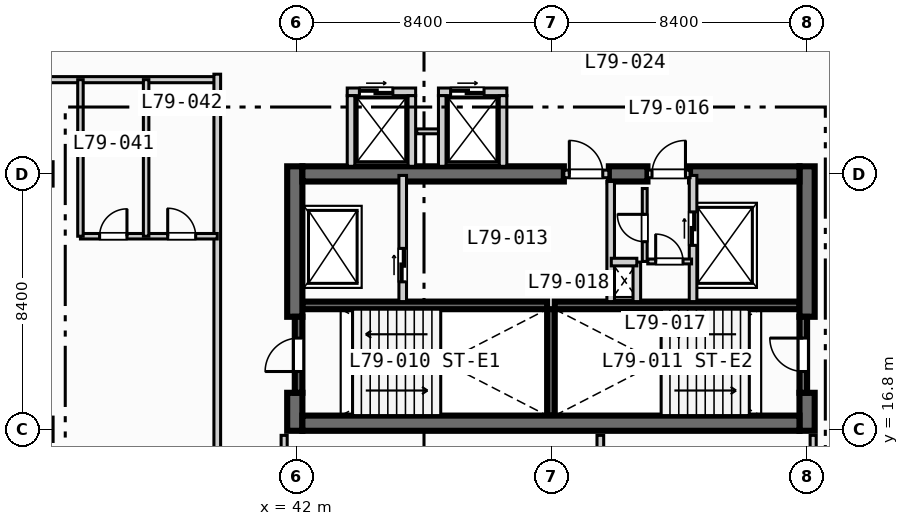
"""IFC4 building model, lengths in metres.
Left out: names, types, materials, properties, quantities, classifications, styles, units other than length and angle.
Written with IfcOpenShell. Run it as: python <this file> out.ifc"""

import sys

from ifc_helpers import new_model, si_unit, direction, frame, frame_2d, origin, place, context, subcontext, project, spatial, rectangle, extrude, element, fill, save


model = new_model("IFC4")
c1 = context("Model", 3, precision=1e-05, world=origin(), true_north=direction((0.0, 1.0)))
c2 = subcontext(c1, "Body", "Model", "MODEL_VIEW")
j1 = project(units=[si_unit("LENGTHUNIT", "METRE"), si_unit("PLANEANGLEUNIT", "RADIAN")], contexts=[c1])
p1 = place(None, origin())
s1 = spatial("IfcSite", under=j1, at=p1, CompositionType="ELEMENT")
p2 = place(p1, origin())
s2 = spatial("IfcBuilding", under=s1, at=p2, CompositionType="ELEMENT")
p3 = place(p2, frame((0.0, 0.0, 320.3)))
s3 = spatial("IfcBuildingStorey", under=s2, at=p3, CompositionType="ELEMENT", Elevation=320.3)
for number, where, z_axis, x_axis in (
    (1, (42.2, 20.875, 0.0), (0.0, 0.0, 1.0), (1.0, 0.0, 0.0)),
    (2, (50.5, 20.875, 0.0), (0.0, 0.0, 1.0), (1.0, 0.0, 0.0)),
):
    element("IfcWall", number, at=place(p3, frame(where, z_axis=z_axis, x_axis=x_axis)), inside=s3, PredefinedType="SOLIDWALL", context=c2, shape_type="SweptSolid", body=[
        extrude(rectangle(XDim=8.05, YDim=0.25, at=frame_2d((4.025, 0.0))), origin(), (0.0, 0.0, 1.0), 3.67),
    ])
p4 = place(p3, frame((50.375, 17.25, 0.0), z_axis=(0.0, 0.0, 1.0), x_axis=(0.0, 1.0, 0.0)))
e3 = element("IfcWall", 3, at=p4, inside=s3, PredefinedType="SOLIDWALL", context=c2, shape_type="SweptSolid", body=[
    extrude(rectangle(XDim=3.5, YDim=0.25, at=frame_2d((1.75, 0.0))), origin(), (0.0, 0.0, 1.0), 3.67),
])
p5 = place(p3, frame((41.95, 16.75, 0.0), z_axis=(0.0, 0.0, 1.0), x_axis=(0.0, 1.0, 0.0)))
e4 = element("IfcWall", 4, at=p5, inside=s3, PredefinedType="SHEAR", context=c2, shape_type="SweptSolid", body=[
    extrude(rectangle(XDim=1.25, YDim=0.5, at=frame_2d((0.625, 0.0))), origin(), (0.0, 0.0, 1.0), 3.67),
])
p6 = place(p3, frame((41.95, 20.5, 0.0), z_axis=(0.0, 0.0, 1.0), x_axis=(0.0, 1.0, 0.0)))
e5 = element("IfcWall", 5, at=p6, inside=s3, PredefinedType="SHEAR", context=c2, shape_type="SweptSolid", body=[
    extrude(rectangle(XDim=4.95, YDim=0.5, at=frame_2d((2.475, 0.0))), origin(), (0.0, 0.0, 1.0), 3.67),
])
p7 = place(p3, frame((58.8, 16.75, 0.0), z_axis=(0.0, 0.0, 1.0), x_axis=(0.0, 1.0, 0.0)))
e6 = element("IfcWall", 6, at=p7, inside=s3, PredefinedType="SHEAR", context=c2, shape_type="SweptSolid", body=[
    extrude(rectangle(XDim=1.25, YDim=0.5, at=frame_2d((0.625, 0.0))), origin(), (0.0, 0.0, 1.0), 3.67),
])
p8 = place(p3, frame((58.8, 20.5, 0.0), z_axis=(0.0, 0.0, 1.0), x_axis=(0.0, 1.0, 0.0)))
e7 = element("IfcWall", 7, at=p8, inside=s3, PredefinedType="SHEAR", context=c2, shape_type="SweptSolid", body=[
    extrude(rectangle(XDim=4.95, YDim=0.5, at=frame_2d((2.475, 0.0))), origin(), (0.0, 0.0, 1.0), 3.67),
])
p9 = place(p3, frame((42.2, 17.0, 0.0), z_axis=(0.0, 0.0, 1.0), x_axis=(1.0, 0.0, 0.0)))
e8 = element("IfcWall", 8, at=p9, inside=s3, PredefinedType="SHEAR", context=c2, shape_type="SweptSolid", body=[
    extrude(rectangle(XDim=16.35, YDim=0.5, at=frame_2d((8.175, 0.0))), origin(), (0.0, 0.0, 1.0), 3.67),
])
p10 = place(p3, frame((42.2, 25.2, 0.0), z_axis=(0.0, 0.0, 1.0), x_axis=(1.0, 0.0, 0.0)))
e9 = element("IfcWall", 9, at=p10, inside=s3, PredefinedType="SHEAR", context=c2, shape_type="SweptSolid", body=[
    extrude(rectangle(XDim=8.6, YDim=0.5, at=frame_2d((4.3, 0.0))), origin(), (0.0, 0.0, 1.0), 3.67),
])
p11 = place(p3, frame((52.28, 25.2, 0.0), z_axis=(0.0, 0.0, 1.0), x_axis=(1.0, 0.0, 0.0)))
e10 = element("IfcWall", 10, at=p11, inside=s3, PredefinedType="SHEAR", context=c2, shape_type="SweptSolid", body=[
    extrude(rectangle(XDim=1.27, YDim=0.5, at=frame_2d((0.635, 0.0))), origin(), (0.0, 0.0, 1.0), 3.67),
])
p12 = place(p3, frame((54.95, 25.2, 0.0), z_axis=(0.0, 0.0, 1.0), x_axis=(1.0, 0.0, 0.0)))
e11 = element("IfcWall", 11, at=p12, inside=s3, PredefinedType="SHEAR", context=c2, shape_type="SweptSolid", body=[
    extrude(rectangle(XDim=3.6, YDim=0.5, at=frame_2d((1.8, 0.0))), origin(), (0.0, 0.0, 1.0), 3.67),
])
p13 = place(p3, frame((42.075, 18.0, 0.0), z_axis=(0.0, 0.0, 1.0), x_axis=(0.0, 1.0, 0.0)))
e12 = element("IfcWall", 12, at=p13, inside=s3, PredefinedType="SOLIDWALL", context=c2, shape_type="SweptSolid", body=[
    extrude(rectangle(XDim=2.5, YDim=0.25, at=frame_2d((1.25, 0.0))), origin(), (0.0, 0.0, 1.0), 3.67),
])
p14 = place(p13, frame((0.7, 0.0, 0.0)))
e13 = element("IfcOpeningElement", 13, at=p14, cuts=e12, PredefinedType="OPENING", context=c2, shape_type="SweptSolid", body=[
    extrude(rectangle(XDim=1.1, YDim=2.15, at=frame_2d((0.55, 1.075))), frame((0.0, 0.135, 0.0), z_axis=(0.0, -1.0, 0.0), x_axis=(1.0, 0.0, 0.0)), (0.0, 0.0, 1.0), 0.27),
])
p15 = place(p3, frame((58.675, 18.0, 0.0), z_axis=(0.0, 0.0, 1.0), x_axis=(0.0, 1.0, 0.0)))
e14 = element("IfcWall", 14, at=p15, inside=s3, PredefinedType="SOLIDWALL", context=c2, shape_type="SweptSolid", body=[
    extrude(rectangle(XDim=2.5, YDim=0.25, at=frame_2d((1.25, 0.0))), origin(), (0.0, 0.0, 1.0), 3.67),
])
p16 = place(p15, frame((0.7, 0.0, 0.0)))
e15 = element("IfcOpeningElement", 15, at=p16, cuts=e14, PredefinedType="OPENING", context=c2, shape_type="SweptSolid", body=[
    extrude(rectangle(XDim=1.1, YDim=2.15, at=frame_2d((0.55, 1.075))), frame((0.0, 0.135, 0.0), z_axis=(0.0, -1.0, 0.0), x_axis=(1.0, 0.0, 0.0)), (0.0, 0.0, 1.0), 0.27),
])
p17 = place(p3, frame((45.5, 21.0, 0.0), z_axis=(0.0, 0.0, 1.0), x_axis=(0.0, 1.0, 0.0)))
e16 = element("IfcWall", 16, at=p17, inside=s3, PredefinedType="SOLIDWALL", context=c2, shape_type="SweptSolid", body=[
    extrude(rectangle(XDim=4.15, YDim=0.25, at=frame_2d((2.075, 0.0))), origin(), (0.0, 0.0, 1.0), 3.67),
])
p18 = place(p17, frame((0.65, 0.0, 0.0)))
e17 = element("IfcOpeningElement", 17, at=p18, cuts=e16, PredefinedType="OPENING", context=c2, shape_type="SweptSolid", body=[
    extrude(rectangle(XDim=1.1, YDim=2.15, at=frame_2d((0.55, 1.075))), frame((0.0, 0.135, 0.0), z_axis=(0.0, -1.0, 0.0), x_axis=(1.0, 0.0, 0.0)), (0.0, 0.0, 1.0), 0.27),
])
p19 = place(p3, frame((50.8, 25.2, 0.0), z_axis=(0.0, 0.0, 1.0), x_axis=(1.0, 0.0, 0.0)))
e18 = element("IfcWall", 18, at=p19, inside=s3, PredefinedType="SOLIDWALL", context=c2, shape_type="SweptSolid", body=[
    extrude(rectangle(XDim=1.48, YDim=0.25, at=frame_2d((0.74, 0.0))), origin(), (0.0, 0.0, 1.0), 3.67),
])
p20 = place(p19, frame((0.18, 0.0, 0.0)))
e19 = element("IfcOpeningElement", 19, at=p20, cuts=e18, PredefinedType="OPENING", context=c2, shape_type="SweptSolid", body=[
    extrude(rectangle(XDim=1.1, YDim=2.15, at=frame_2d((0.55, 1.075))), frame((0.0, 0.135, 0.0), z_axis=(0.0, -1.0, 0.0), x_axis=(1.0, 0.0, 0.0)), (0.0, 0.0, 1.0), 0.27),
])
p21 = place(p3, frame((52.34, 21.0, 0.0), z_axis=(0.0, 0.0, 1.0), x_axis=(0.0, 1.0, 0.0)))
e20 = element("IfcWall", 20, at=p21, inside=s3, PredefinedType="SOLIDWALL", context=c2, shape_type="SweptSolid", body=[
    extrude(rectangle(XDim=3.95, YDim=0.25, at=frame_2d((1.975, 0.0))), origin(), (0.0, 0.0, 1.0), 3.67),
])
p22 = place(p3, frame((55.05, 21.0, 0.0), z_axis=(0.0, 0.0, 1.0), x_axis=(0.0, 1.0, 0.0)))
e21 = element("IfcWall", 21, at=p22, inside=s3, PredefinedType="SOLIDWALL", context=c2, shape_type="SweptSolid", body=[
    extrude(rectangle(XDim=4.15, YDim=0.25, at=frame_2d((2.075, 0.0))), origin(), (0.0, 0.0, 1.0), 3.67),
])
p23 = place(p22, frame((1.85, 0.0, 0.0)))
e22 = element("IfcOpeningElement", 22, at=p23, cuts=e21, PredefinedType="OPENING", context=c2, shape_type="SweptSolid", body=[
    extrude(rectangle(XDim=1.1, YDim=2.15, at=frame_2d((0.55, 1.075))), frame((0.0, 0.135, 0.0), z_axis=(0.0, -1.0, 0.0), x_axis=(1.0, 0.0, 0.0)), (0.0, 0.0, 1.0), 0.27),
])
p24 = place(p3, frame((53.55, 25.2, 0.0), z_axis=(0.0, 0.0, 1.0), x_axis=(1.0, 0.0, 0.0)))
e23 = element("IfcWall", 23, at=p24, inside=s3, PredefinedType="SOLIDWALL", context=c2, shape_type="SweptSolid", body=[
    extrude(rectangle(XDim=1.4, YDim=0.25, at=frame_2d((0.7, 0.0))), origin(), (0.0, 0.0, 1.0), 3.67),
])
p25 = place(p24, frame((0.15, 0.0, 0.0)))
e24 = element("IfcOpeningElement", 24, at=p25, cuts=e23, PredefinedType="OPENING", context=c2, shape_type="SweptSolid", body=[
    extrude(rectangle(XDim=1.1, YDim=2.15, at=frame_2d((0.55, 1.075))), frame((0.0, 0.135, 0.0), z_axis=(0.0, -1.0, 0.0), x_axis=(1.0, 0.0, 0.0)), (0.0, 0.0, 1.0), 0.27),
])
p26 = place(p3, frame((53.2, 21.0, 0.0), z_axis=(0.0, 0.0, 1.0), x_axis=(0.0, 1.0, 0.0)))
e25 = element("IfcWall", 25, at=p26, inside=s3, PredefinedType="SOLIDWALL", context=c2, shape_type="SweptSolid", body=[
    extrude(rectangle(XDim=1.3, YDim=0.25, at=frame_2d((0.65, 0.0))), origin(), (0.0, 0.0, 1.0), 3.67),
])
p27 = place(p3, frame((52.36, 22.3, 0.0), z_axis=(0.0, 0.0, 1.0), x_axis=(1.0, 0.0, 0.0)))
e26 = element("IfcWall", 26, at=p27, inside=s3, PredefinedType="SOLIDWALL", context=c2, shape_type="SweptSolid", body=[
    extrude(rectangle(XDim=0.84, YDim=0.25, at=frame_2d((0.42, 0.0))), origin(), (0.0, 0.0, 1.0), 3.67),
])
p28 = place(p3, frame((53.56, 22.32, 0.0), z_axis=(0.0, 0.0, 1.0), x_axis=(1.0, 0.0, 0.0)))
e27 = element("IfcWall", 27, at=p28, inside=s3, PredefinedType="PARTITIONING", context=c2, shape_type="SweptSolid", body=[
    extrude(rectangle(XDim=1.44, YDim=0.16, at=frame_2d((0.72, 0.0))), origin(), (0.0, 0.0, 1.0), 3.67),
])
p29 = place(p28, frame((0.26, 0.0, 0.0)))
e28 = element("IfcOpeningElement", 28, at=p29, cuts=e27, PredefinedType="OPENING", context=c2, shape_type="SweptSolid", body=[
    extrude(rectangle(XDim=0.9, YDim=2.1, at=frame_2d((0.45, 1.05))), frame((0.0, 0.09, 0.0), z_axis=(0.0, -1.0, 0.0), x_axis=(1.0, 0.0, 0.0)), (0.0, 0.0, 1.0), 0.18),
])
p30 = place(p3, frame((53.46, 22.32, 0.0), z_axis=(0.0, 0.0, 1.0), x_axis=(0.0, 1.0, 0.0)))
e29 = element("IfcWall", 29, at=p30, inside=s3, PredefinedType="PARTITIONING", context=c2, shape_type="SweptSolid", body=[
    extrude(rectangle(XDim=2.4, YDim=0.16, at=frame_2d((1.2, 0.0))), origin(), (0.0, 0.0, 1.0), 3.67),
])
p31 = place(p30, frame((0.65, 0.0, 0.0)))
e30 = element("IfcOpeningElement", 30, at=p31, cuts=e29, PredefinedType="OPENING", context=c2, shape_type="SweptSolid", body=[
    extrude(rectangle(XDim=0.9, YDim=2.1, at=frame_2d((0.45, 1.05))), frame((0.0, 0.09, 0.0), z_axis=(0.0, -1.0, 0.0), x_axis=(1.0, 0.0, 0.0)), (0.0, 0.0, 1.0), 0.18),
])
p32 = place(p3, frame((43.675, 27.9, 0.0), z_axis=(0.0, 0.0, 1.0), x_axis=(1.0, 0.0, 0.0)))
e31 = element("IfcWall", 31, at=p32, inside=s3, PredefinedType="SOLIDWALL", context=c2, shape_type="SweptSolid", body=[
    extrude(rectangle(XDim=2.25, YDim=0.25, at=frame_2d((1.125, 0.0))), origin(), (0.0, 0.0, 1.0), 3.67),
])
p33 = place(p32, frame((0.4, 0.0, 0.0)))
e32 = element("IfcOpeningElement", 32, at=p33, cuts=e31, PredefinedType="OPENING", context=c2, shape_type="SweptSolid", body=[
    extrude(rectangle(XDim=1.1, YDim=2.15, at=frame_2d((0.55, 1.075))), frame((0.0, 0.135, 0.0), z_axis=(0.0, -1.0, 0.0), x_axis=(1.0, 0.0, 0.0)), (0.0, 0.0, 1.0), 0.27),
])
for number, where, z_axis, x_axis in (
    (33, (43.8, 25.45, 0.0), (0.0, 0.0, 1.0), (0.0, 1.0, 0.0)),
    (34, (45.8, 25.45, 0.0), (0.0, 0.0, 1.0), (0.0, 1.0, 0.0)),
):
    element("IfcWall", number, at=place(p3, frame(where, z_axis=z_axis, x_axis=x_axis)), inside=s3, PredefinedType="SOLIDWALL", context=c2, shape_type="SweptSolid", body=[
        extrude(rectangle(XDim=2.325, YDim=0.25, at=frame_2d((1.163, 0.0))), origin(), (0.0, 0.0, 1.0), 3.67),
    ])
p34 = place(p3, frame((45.96, 26.6, 0.0), z_axis=(0.0, 0.0, 1.0), x_axis=(1.0, 0.0, 0.0)))
e35 = element("IfcWall", 35, at=p34, inside=s3, PredefinedType="PARTITIONING", context=c2, shape_type="SweptSolid", body=[
    extrude(rectangle(XDim=0.88, YDim=0.16, at=frame_2d((0.44, 0.0))), origin(), (0.0, 0.0, 1.0), 3.67),
])
p35 = place(p3, frame((46.675, 27.9, 0.0), z_axis=(0.0, 0.0, 1.0), x_axis=(1.0, 0.0, 0.0)))
e36 = element("IfcWall", 36, at=p35, inside=s3, PredefinedType="SOLIDWALL", context=c2, shape_type="SweptSolid", body=[
    extrude(rectangle(XDim=2.25, YDim=0.25, at=frame_2d((1.125, 0.0))), origin(), (0.0, 0.0, 1.0), 3.67),
])
p36 = place(p35, frame((0.4, 0.0, 0.0)))
e37 = element("IfcOpeningElement", 37, at=p36, cuts=e36, PredefinedType="OPENING", context=c2, shape_type="SweptSolid", body=[
    extrude(rectangle(XDim=1.1, YDim=2.15, at=frame_2d((0.55, 1.075))), frame((0.0, 0.135, 0.0), z_axis=(0.0, -1.0, 0.0), x_axis=(1.0, 0.0, 0.0)), (0.0, 0.0, 1.0), 0.27),
])
for number, where, z_axis, x_axis in (
    (38, (46.8, 25.45, 0.0), (0.0, 0.0, 1.0), (0.0, 1.0, 0.0)),
    (39, (48.8, 25.45, 0.0), (0.0, 0.0, 1.0), (0.0, 1.0, 0.0)),
):
    element("IfcWall", number, at=place(p3, frame(where, z_axis=z_axis, x_axis=x_axis)), inside=s3, PredefinedType="SOLIDWALL", context=c2, shape_type="SweptSolid", body=[
        extrude(rectangle(XDim=2.325, YDim=0.25, at=frame_2d((1.163, 0.0))), origin(), (0.0, 0.0, 1.0), 3.67),
    ])
p37 = place(p3, frame((41.6, 8.65, 0.0), z_axis=(0.0, 0.0, 1.0), x_axis=(0.0, 1.0, 0.0)))
e40 = element("IfcWall", 40, at=p37, inside=s3, PredefinedType="PARTITIONING", context=c2, shape_type="SweptSolid", body=[
    extrude(rectangle(XDim=7.95, YDim=0.2, at=frame_2d((3.975, 0.0))), origin(), (0.0, 0.0, 1.0), 3.67),
])
p38 = place(p37, frame((2.2, 0.0, 0.0)))
e41 = element("IfcOpeningElement", 41, at=p38, cuts=e40, PredefinedType="OPENING", context=c2, shape_type="SweptSolid", body=[
    extrude(rectangle(XDim=0.92, YDim=2.1, at=frame_2d((0.46, 1.05))), frame((0.0, 0.11, 0.0), z_axis=(0.0, -1.0, 0.0), x_axis=(1.0, 0.0, 0.0)), (0.0, 0.0, 1.0), 0.22),
])
p39 = place(p3, frame((59.0, 8.65, 0.0), z_axis=(0.0, 0.0, 1.0), x_axis=(0.0, 1.0, 0.0)))
e42 = element("IfcWall", 42, at=p39, inside=s3, PredefinedType="PARTITIONING", context=c2, shape_type="SweptSolid", body=[
    extrude(rectangle(XDim=7.95, YDim=0.2, at=frame_2d((3.975, 0.0))), origin(), (0.0, 0.0, 1.0), 3.07),
])
p40 = place(p39, frame((2.2, 0.0, 0.0)))
e43 = element("IfcOpeningElement", 43, at=p40, cuts=e42, PredefinedType="OPENING", context=c2, shape_type="SweptSolid", body=[
    extrude(rectangle(XDim=0.92, YDim=2.1, at=frame_2d((0.46, 1.05))), frame((0.0, 0.11, 0.0), z_axis=(0.0, -1.0, 0.0), x_axis=(1.0, 0.0, 0.0)), (0.0, 0.0, 1.0), 0.22),
])
p41 = place(p3, frame((52.0, 8.65, 0.0), z_axis=(0.0, 0.0, 1.0), x_axis=(0.0, 1.0, 0.0)))
e44 = element("IfcWall", 44, at=p41, inside=s3, PredefinedType="PARTITIONING", context=c2, shape_type="SweptSolid", body=[
    extrude(rectangle(XDim=7.95, YDim=0.22, at=frame_2d((3.975, 0.0))), origin(), (0.0, 0.0, 1.0), 3.67),
])
p42 = place(p3, frame((11.8, 28.3, 0.0), z_axis=(0.0, 0.0, 1.0), x_axis=(1.0, 0.0, 0.0)))
e45 = element("IfcWall", 45, at=p42, inside=s3, PredefinedType="PARTITIONING", context=c2, shape_type="SweptSolid", body=[
    extrude(rectangle(XDim=27.6, YDim=0.2, at=frame_2d((13.8, 0.0))), origin(), (0.0, 0.0, 1.0), 3.67),
])
p43 = place(p42, frame((3.92, 0.0, 0.0)))
e46 = element("IfcOpeningElement", 46, at=p43, cuts=e45, PredefinedType="OPENING", context=c2, shape_type="SweptSolid", body=[
    extrude(rectangle(XDim=1.0, YDim=2.15, at=frame_2d((0.5, 1.075))), frame((0.0, 0.11, 0.0), z_axis=(0.0, -1.0, 0.0), x_axis=(1.0, 0.0, 0.0)), (0.0, 0.0, 1.0), 0.22),
])
p44 = place(p42, frame((12.57, 0.0, 0.0)))
e47 = element("IfcOpeningElement", 47, at=p44, cuts=e45, PredefinedType="OPENING", context=c2, shape_type="SweptSolid", body=[
    extrude(rectangle(XDim=1.0, YDim=2.15, at=frame_2d((0.5, 1.075))), frame((0.0, 0.11, 0.0), z_axis=(0.0, -1.0, 0.0), x_axis=(1.0, 0.0, 0.0)), (0.0, 0.0, 1.0), 0.22),
])
p45 = place(p42, frame((20.77, 0.0, 0.0)))
e48 = element("IfcOpeningElement", 48, at=p45, cuts=e45, PredefinedType="OPENING", context=c2, shape_type="SweptSolid", body=[
    extrude(rectangle(XDim=1.0, YDim=2.15, at=frame_2d((0.5, 1.075))), frame((0.0, 0.11, 0.0), z_axis=(0.0, -1.0, 0.0), x_axis=(1.0, 0.0, 0.0)), (0.0, 0.0, 1.0), 0.22),
])
p46 = place(p3, frame((39.4, 8.6, 0.0), z_axis=(0.0, 0.0, 1.0), x_axis=(0.0, 1.0, 0.0)))
e49 = element("IfcWall", 49, at=p46, inside=s3, PredefinedType="PARTITIONING", context=c2, shape_type="SweptSolid", body=[
    extrude(rectangle(XDim=19.88, YDim=0.22, at=frame_2d((9.94, 0.0))), origin(), (0.0, 0.0, 1.0), 3.67),
])
p47 = place(p3, frame((34.9, 23.15, 0.0), z_axis=(0.0, 0.0, 1.0), x_axis=(1.0, 0.0, 0.0)))
e50 = element("IfcWall", 50, at=p47, inside=s3, PredefinedType="PLUMBINGWALL", context=c2, shape_type="SweptSolid", body=[
    extrude(rectangle(XDim=4.5, YDim=0.18, at=frame_2d((2.25, 0.0))), origin(), (0.0, 0.0, 1.0), 3.67),
])
p48 = place(p47, frame((0.63, 0.0, 0.0)))
e51 = element("IfcOpeningElement", 51, at=p48, cuts=e50, PredefinedType="OPENING", context=c2, shape_type="SweptSolid", body=[
    extrude(rectangle(XDim=0.9, YDim=2.1, at=frame_2d((0.45, 1.05))), frame((0.0, 0.1, 0.0), z_axis=(0.0, -1.0, 0.0), x_axis=(1.0, 0.0, 0.0)), (0.0, 0.0, 1.0), 0.2),
])
p49 = place(p47, frame((2.87, 0.0, 0.0)))
e52 = element("IfcOpeningElement", 52, at=p49, cuts=e50, PredefinedType="OPENING", context=c2, shape_type="SweptSolid", body=[
    extrude(rectangle(XDim=0.92, YDim=2.1, at=frame_2d((0.46, 1.05))), frame((0.0, 0.1, 0.0), z_axis=(0.0, -1.0, 0.0), x_axis=(1.0, 0.0, 0.0)), (0.0, 0.0, 1.0), 0.2),
])
for number, where, z_axis, x_axis in (
    (53, (34.9, 23.15, 0.0), (0.0, 0.0, 1.0), (0.0, 1.0, 0.0)),
    (54, (37.06, 23.15, 0.0), (0.0, 0.0, 1.0), (0.0, 1.0, 0.0)),
):
    element("IfcWall", number, at=place(p3, frame(where, z_axis=z_axis, x_axis=x_axis)), inside=s3, PredefinedType="PLUMBINGWALL", context=c2, shape_type="SweptSolid", body=[
        extrude(rectangle(XDim=5.15, YDim=0.18, at=frame_2d((2.575, 0.0))), origin(), (0.0, 0.0, 1.0), 3.67),
    ])
p50 = place(p14, origin())
e55 = element("IfcDoor", 55, at=p50, inside=s3, OperationType="SINGLE_SWING_LEFT", PredefinedType="DOOR", context=c2, shape_type="SweptSolid", body=[
    extrude(rectangle(XDim=1.1, YDim=2.15, at=frame_2d((0.55, 1.075))), frame((0.0, 0.025, 0.0), z_axis=(0.0, -1.0, 0.0), x_axis=(1.0, 0.0, 0.0)), (0.0, 0.0, 1.0), 0.05),
])
fill(e13, e55)
p51 = place(p16, origin())
e56 = element("IfcDoor", 56, at=p51, inside=s3, OperationType="SINGLE_SWING_RIGHT", PredefinedType="DOOR", context=c2, shape_type="SweptSolid", body=[
    extrude(rectangle(XDim=1.1, YDim=2.15, at=frame_2d((0.55, 1.075))), frame((0.0, 0.025, 0.0), z_axis=(0.0, -1.0, 0.0), x_axis=(1.0, 0.0, 0.0)), (0.0, 0.0, 1.0), 0.05),
])
fill(e15, e56)
p52 = place(p18, origin())
e57 = element("IfcDoor", 57, at=p52, inside=s3, OperationType="SLIDING_TO_LEFT", PredefinedType="DOOR", context=c2, shape_type="SweptSolid", body=[
    extrude(rectangle(XDim=1.1, YDim=2.15, at=frame_2d((0.55, 1.075))), frame((0.0, 0.025, 0.0), z_axis=(0.0, -1.0, 0.0), x_axis=(1.0, 0.0, 0.0)), (0.0, 0.0, 1.0), 0.05),
])
fill(e17, e57)
p53 = place(p20, origin())
e58 = element("IfcDoor", 58, at=p53, inside=s3, OperationType="SINGLE_SWING_LEFT", PredefinedType="DOOR", context=c2, shape_type="SweptSolid", body=[
    extrude(rectangle(XDim=1.1, YDim=2.15, at=frame_2d((0.55, 1.075))), frame((0.0, 0.025, 0.0), z_axis=(0.0, -1.0, 0.0), x_axis=(1.0, 0.0, 0.0)), (0.0, 0.0, 1.0), 0.05),
])
fill(e19, e58)
p54 = place(p23, origin())
e59 = element("IfcDoor", 59, at=p54, inside=s3, OperationType="SLIDING_TO_LEFT", PredefinedType="DOOR", context=c2, shape_type="SweptSolid", body=[
    extrude(rectangle(XDim=1.1, YDim=2.15, at=frame_2d((0.55, 1.075))), frame((0.0, 0.025, 0.0), z_axis=(0.0, -1.0, 0.0), x_axis=(1.0, 0.0, 0.0)), (0.0, 0.0, 1.0), 0.05),
])
fill(e22, e59)
p55 = place(p25, origin())
e60 = element("IfcDoor", 60, at=p55, inside=s3, OperationType="SINGLE_SWING_RIGHT", PredefinedType="DOOR", context=c2, shape_type="SweptSolid", body=[
    extrude(rectangle(XDim=1.1, YDim=2.15, at=frame_2d((0.55, 1.075))), frame((0.0, 0.025, 0.0), z_axis=(0.0, -1.0, 0.0), x_axis=(1.0, 0.0, 0.0)), (0.0, 0.0, 1.0), 0.05),
])
fill(e24, e60)
p56 = place(p29, origin())
e61 = element("IfcDoor", 61, at=p56, inside=s3, OperationType="SINGLE_SWING_LEFT", PredefinedType="DOOR", context=c2, shape_type="SweptSolid", body=[
    extrude(rectangle(XDim=0.9, YDim=2.1, at=frame_2d((0.45, 1.05))), frame((0.0, 0.025, 0.0), z_axis=(0.0, -1.0, 0.0), x_axis=(1.0, 0.0, 0.0)), (0.0, 0.0, 1.0), 0.05),
])
fill(e28, e61)
p57 = place(p31, origin())
e62 = element("IfcDoor", 62, at=p57, inside=s3, OperationType="SINGLE_SWING_RIGHT", PredefinedType="DOOR", context=c2, shape_type="SweptSolid", body=[
    extrude(rectangle(XDim=0.9, YDim=2.1, at=frame_2d((0.45, 1.05))), frame((0.0, 0.025, 0.0), z_axis=(0.0, -1.0, 0.0), x_axis=(1.0, 0.0, 0.0)), (0.0, 0.0, 1.0), 0.05),
])
fill(e30, e62)
p58 = place(p33, origin())
e63 = element("IfcDoor", 63, at=p58, inside=s3, OperationType="SLIDING_TO_LEFT", PredefinedType="DOOR", context=c2, shape_type="SweptSolid", body=[
    extrude(rectangle(XDim=1.1, YDim=2.15, at=frame_2d((0.55, 1.075))), frame((0.0, 0.025, 0.0), z_axis=(0.0, -1.0, 0.0), x_axis=(1.0, 0.0, 0.0)), (0.0, 0.0, 1.0), 0.05),
])
fill(e32, e63)
p59 = place(p36, origin())
e64 = element("IfcDoor", 64, at=p59, inside=s3, OperationType="SLIDING_TO_LEFT", PredefinedType="DOOR", context=c2, shape_type="SweptSolid", body=[
    extrude(rectangle(XDim=1.1, YDim=2.15, at=frame_2d((0.55, 1.075))), frame((0.0, 0.025, 0.0), z_axis=(0.0, -1.0, 0.0), x_axis=(1.0, 0.0, 0.0)), (0.0, 0.0, 1.0), 0.05),
])
fill(e37, e64)
p60 = place(p48, origin())
e65 = element("IfcDoor", 65, at=p60, inside=s3, OperationType="SINGLE_SWING_RIGHT", PredefinedType="DOOR", context=c2, shape_type="SweptSolid", body=[
    extrude(rectangle(XDim=0.9, YDim=2.1, at=frame_2d((0.45, 1.05))), frame((0.0, 0.025, 0.0), z_axis=(0.0, -1.0, 0.0), x_axis=(1.0, 0.0, 0.0)), (0.0, 0.0, 1.0), 0.05),
])
fill(e51, e65)
p61 = place(p49, origin())
e66 = element("IfcDoor", 66, at=p61, inside=s3, OperationType="SINGLE_SWING_LEFT", PredefinedType="DOOR", context=c2, shape_type="SweptSolid", body=[
    extrude(rectangle(XDim=0.92, YDim=2.1, at=frame_2d((0.46, 1.05))), frame((0.0, 0.025, 0.0), z_axis=(0.0, -1.0, 0.0), x_axis=(1.0, 0.0, 0.0)), (0.0, 0.0, 1.0), 0.05),
])
fill(e52, e66)
save(model, sys.argv[1])
